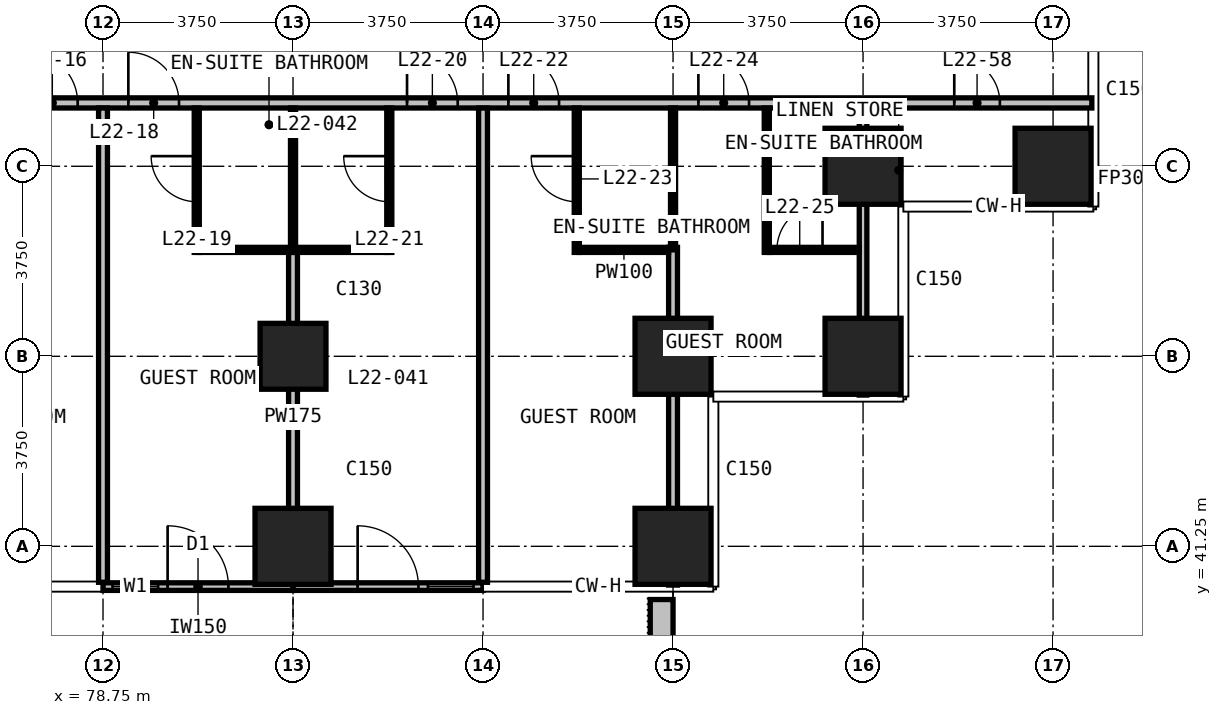
"""IFC4 building model, lengths in metres.
Left out: names, types, materials, properties, quantities, classifications, styles, units other than length and angle.
Written with IfcOpenShell. Run it as: python <this file> out.ifc"""

import sys

from ifc_helpers import new_model, si_unit, direction, frame, frame_2d, origin, origin_2d, place, context, subcontext, project, spatial, rectangle, extrude, element, fill, save


model = new_model("IFC4")
c1 = context("Model", 3, precision=1e-05, world=origin(), true_north=direction((0.0, 1.0)))
c2 = subcontext(c1, "Body", "Model", "MODEL_VIEW")
j1 = project(units=[si_unit("LENGTHUNIT", "METRE"), si_unit("PLANEANGLEUNIT", "RADIAN")], contexts=[c1])
p1 = place(None, origin())
s1 = spatial("IfcSite", under=j1, at=p1, CompositionType="ELEMENT")
p2 = place(p1, origin())
s2 = spatial("IfcBuilding", under=s1, at=p2, CompositionType="ELEMENT")
p3 = place(p2, frame((0.0, 0.0, 92.3)))
s3 = spatial("IfcBuildingStorey", under=s2, at=p3, CompositionType="ELEMENT", Elevation=92.3)
p4 = place(p3, frame((82.5, 41.25, 0.0), z_axis=(0.0, 0.0, 1.0), x_axis=(1.0, 0.0, 0.0)))
e1 = element("IfcColumn", 1, at=p4, inside=s3, PredefinedType="COLUMN", context=c2, shape_type="SweptSolid", body=[
    extrude(rectangle(XDim=1.5, YDim=1.5, at=origin_2d()), origin(), (0.0, 0.0, 1.0), 3.3),
])
p5 = place(p3, frame((82.5, 45.0, 0.0), z_axis=(0.0, 0.0, 1.0), x_axis=(1.0, 0.0, 0.0)))
e2 = element("IfcColumn", 2, at=p5, inside=s3, PredefinedType="COLUMN", context=c2, shape_type="SweptSolid", body=[
    extrude(rectangle(XDim=1.3, YDim=1.3, at=origin_2d()), origin(), (0.0, 0.0, 1.0), 3.3),
])
for number, where, z_axis, x_axis in (
    (3, (90.0, 41.25, 0.0), (0.0, 0.0, 1.0), (1.0, 0.0, 0.0)),
    (4, (90.0, 45.0, 0.0), (0.0, 0.0, 1.0), (1.0, 0.0, 0.0)),
    (5, (93.75, 45.0, 0.0), (0.0, 0.0, 1.0), (1.0, 0.0, 0.0)),
    (6, (93.75, 48.75, 0.0), (0.0, 0.0, 1.0), (1.0, 0.0, 0.0)),
    (7, (97.5, 48.75, 0.0), (0.0, 0.0, 1.0), (1.0, 0.0, 0.0)),
):
    element("IfcColumn", number, at=place(p3, frame(where, z_axis=z_axis, x_axis=x_axis)), inside=s3, PredefinedType="COLUMN", context=c2, shape_type="SweptSolid", body=[
        extrude(rectangle(XDim=1.5, YDim=1.5, at=origin_2d()), origin(), (0.0, 0.0, 1.0), 3.3),
    ])
p6 = place(p3, frame((78.75, 40.455, 0.0), z_axis=(0.0, 0.0, 1.0), x_axis=(1.0, 0.0, 0.0)))
e8 = element("IfcWall", 8, at=p6, inside=s3, PredefinedType="SOLIDWALL", context=c2, shape_type="SweptSolid", body=[
    extrude(rectangle(XDim=3.75, YDim=0.15, at=frame_2d((1.875, 0.0))), origin(), (0.0, 0.0, 1.0), 3.0),
])
p7 = place(p6, frame((0.188, 0.0, 0.1)))
e9 = element("IfcOpeningElement", 9, at=p7, cuts=e8, PredefinedType="OPENING", context=c2, shape_type="SweptSolid", body=[
    extrude(rectangle(XDim=0.9, YDim=2.4, at=frame_2d((0.45, 1.2))), frame((0.0, 0.085, 0.0), z_axis=(0.0, -1.0, 0.0), x_axis=(1.0, 0.0, 0.0)), (0.0, 0.0, 1.0), 0.17),
])
p8 = place(p6, frame((1.275, 0.0, 0.0)))
e10 = element("IfcOpeningElement", 10, at=p8, cuts=e8, PredefinedType="OPENING", context=c2, shape_type="SweptSolid", body=[
    extrude(rectangle(XDim=1.2, YDim=2.4, at=frame_2d((0.6, 1.2))), frame((0.0, 0.085, 0.0), z_axis=(0.0, -1.0, 0.0), x_axis=(1.0, 0.0, 0.0)), (0.0, 0.0, 1.0), 0.17),
])
p9 = place(p3, frame((82.5, 40.455, 0.0), z_axis=(0.0, 0.0, 1.0), x_axis=(1.0, 0.0, 0.0)))
e11 = element("IfcWall", 11, at=p9, inside=s3, PredefinedType="SOLIDWALL", context=c2, shape_type="SweptSolid", body=[
    extrude(rectangle(XDim=3.75, YDim=0.15, at=frame_2d((1.875, 0.0))), origin(), (0.0, 0.0, 1.0), 3.0),
])
p10 = place(p9, frame((1.275, 0.0, 0.0)))
e12 = element("IfcOpeningElement", 12, at=p10, cuts=e11, PredefinedType="OPENING", context=c2, shape_type="SweptSolid", body=[
    extrude(rectangle(XDim=1.2, YDim=2.4, at=frame_2d((0.6, 1.2))), frame((0.0, 0.085, 0.0), z_axis=(0.0, -1.0, 0.0), x_axis=(1.0, 0.0, 0.0)), (0.0, 0.0, 1.0), 0.17),
])
p11 = place(p9, frame((2.663, 0.0, 0.1)))
e13 = element("IfcOpeningElement", 13, at=p11, cuts=e11, PredefinedType="OPENING", context=c2, shape_type="SweptSolid", body=[
    extrude(rectangle(XDim=0.9, YDim=2.4, at=frame_2d((0.45, 1.2))), frame((0.0, 0.085, 0.0), z_axis=(0.0, -1.0, 0.0), x_axis=(1.0, 0.0, 0.0)), (0.0, 0.0, 1.0), 0.17),
])
p12 = place(p3, frame((89.775, 40.2, 0.0), z_axis=(0.0, 0.0, 1.0), x_axis=(0.0, -1.0, 0.0)))
e14 = element("IfcWall", 14, at=p12, inside=s3, PredefinedType="USERDEFINED", context=c2, shape_type="SweptSolid", body=[
    extrude(rectangle(XDim=2.35, YDim=0.45, at=frame_2d((1.175, 0.0))), origin(), (0.0, 0.0, 1.0), 1.1),
])
p13 = place(p3, frame((51.735, 50.0, 0.0), z_axis=(0.0, 0.0, 1.0), x_axis=(1.0, 0.0, 0.0)))
e15 = element("IfcWall", 15, at=p13, inside=s3, PredefinedType="PARTITIONING", context=c2, shape_type="SweptSolid", body=[
    extrude(rectangle(XDim=46.53, YDim=0.2, at=frame_2d((23.265, 0.0))), origin(), (0.0, 0.0, 1.0), 3.0),
])
p14 = place(p13, frame((6.765, 0.0, 0.0)))
e16 = element("IfcOpeningElement", 16, at=p14, cuts=e15, PredefinedType="OPENING", context=c2, shape_type="SweptSolid", body=[
    extrude(rectangle(XDim=1.0, YDim=2.2, at=frame_2d((0.5, 1.1))), frame((0.0, 0.11, 0.0), z_axis=(0.0, -1.0, 0.0), x_axis=(1.0, 0.0, 0.0)), (0.0, 0.0, 1.0), 0.22),
])
p15 = place(p13, frame((10.515, 0.0, 0.0)))
e17 = element("IfcOpeningElement", 17, at=p15, cuts=e15, PredefinedType="OPENING", context=c2, shape_type="SweptSolid", body=[
    extrude(rectangle(XDim=1.0, YDim=2.2, at=frame_2d((0.5, 1.1))), frame((0.0, 0.11, 0.0), z_axis=(0.0, -1.0, 0.0), x_axis=(1.0, 0.0, 0.0)), (0.0, 0.0, 1.0), 0.22),
])
p16 = place(p13, frame((12.515, 0.0, 0.0)))
e18 = element("IfcOpeningElement", 18, at=p16, cuts=e15, PredefinedType="OPENING", context=c2, shape_type="SweptSolid", body=[
    extrude(rectangle(XDim=1.0, YDim=2.2, at=frame_2d((0.5, 1.1))), frame((0.0, 0.11, 0.0), z_axis=(0.0, -1.0, 0.0), x_axis=(1.0, 0.0, 0.0)), (0.0, 0.0, 1.0), 0.22),
])
p17 = place(p13, frame((18.015, 0.0, 0.0)))
e19 = element("IfcOpeningElement", 19, at=p17, cuts=e15, PredefinedType="OPENING", context=c2, shape_type="SweptSolid", body=[
    extrude(rectangle(XDim=1.0, YDim=2.2, at=frame_2d((0.5, 1.1))), frame((0.0, 0.11, 0.0), z_axis=(0.0, -1.0, 0.0), x_axis=(1.0, 0.0, 0.0)), (0.0, 0.0, 1.0), 0.22),
])
p18 = place(p13, frame((20.015, 0.0, 0.0)))
e20 = element("IfcOpeningElement", 20, at=p18, cuts=e15, PredefinedType="OPENING", context=c2, shape_type="SweptSolid", body=[
    extrude(rectangle(XDim=1.0, YDim=2.2, at=frame_2d((0.5, 1.1))), frame((0.0, 0.11, 0.0), z_axis=(0.0, -1.0, 0.0), x_axis=(1.0, 0.0, 0.0)), (0.0, 0.0, 1.0), 0.22),
])
p19 = place(p13, frame((25.515, 0.0, 0.0)))
e21 = element("IfcOpeningElement", 21, at=p19, cuts=e15, PredefinedType="OPENING", context=c2, shape_type="SweptSolid", body=[
    extrude(rectangle(XDim=1.0, YDim=2.2, at=frame_2d((0.5, 1.1))), frame((0.0, 0.11, 0.0), z_axis=(0.0, -1.0, 0.0), x_axis=(1.0, 0.0, 0.0)), (0.0, 0.0, 1.0), 0.22),
])
p20 = place(p13, frame((27.515, 0.0, 0.0)))
e22 = element("IfcOpeningElement", 22, at=p20, cuts=e15, PredefinedType="OPENING", context=c2, shape_type="SweptSolid", body=[
    extrude(rectangle(XDim=1.0, YDim=2.2, at=frame_2d((0.5, 1.1))), frame((0.0, 0.11, 0.0), z_axis=(0.0, -1.0, 0.0), x_axis=(1.0, 0.0, 0.0)), (0.0, 0.0, 1.0), 0.22),
])
p21 = place(p13, frame((33.015, 0.0, 0.0)))
e23 = element("IfcOpeningElement", 23, at=p21, cuts=e15, PredefinedType="OPENING", context=c2, shape_type="SweptSolid", body=[
    extrude(rectangle(XDim=1.0, YDim=2.2, at=frame_2d((0.5, 1.1))), frame((0.0, 0.11, 0.0), z_axis=(0.0, -1.0, 0.0), x_axis=(1.0, 0.0, 0.0)), (0.0, 0.0, 1.0), 0.22),
])
p22 = place(p13, frame((35.015, 0.0, 0.0)))
e24 = element("IfcOpeningElement", 24, at=p22, cuts=e15, PredefinedType="OPENING", context=c2, shape_type="SweptSolid", body=[
    extrude(rectangle(XDim=1.0, YDim=2.2, at=frame_2d((0.5, 1.1))), frame((0.0, 0.11, 0.0), z_axis=(0.0, -1.0, 0.0), x_axis=(1.0, 0.0, 0.0)), (0.0, 0.0, 1.0), 0.22),
])
p23 = place(p13, frame((38.765, 0.0, 0.0)))
e25 = element("IfcOpeningElement", 25, at=p23, cuts=e15, PredefinedType="OPENING", context=c2, shape_type="SweptSolid", body=[
    extrude(rectangle(XDim=1.0, YDim=2.2, at=frame_2d((0.5, 1.1))), frame((0.0, 0.11, 0.0), z_axis=(0.0, -1.0, 0.0), x_axis=(1.0, 0.0, 0.0)), (0.0, 0.0, 1.0), 0.22),
])
p24 = place(p13, frame((1.8, 0.0, 0.0)))
e26 = element("IfcOpeningElement", 26, at=p24, cuts=e15, PredefinedType="OPENING", context=c2, shape_type="SweptSolid", body=[
    extrude(rectangle(XDim=0.9, YDim=2.2, at=frame_2d((0.45, 1.1))), frame((0.0, 0.11, 0.0), z_axis=(0.0, -1.0, 0.0), x_axis=(1.0, 0.0, 0.0)), (0.0, 0.0, 1.0), 0.22),
])
p25 = place(p13, frame((43.815, 0.0, 0.0)))
e27 = element("IfcOpeningElement", 27, at=p25, cuts=e15, PredefinedType="OPENING", context=c2, shape_type="SweptSolid", body=[
    extrude(rectangle(XDim=0.9, YDim=2.2, at=frame_2d((0.45, 1.1))), frame((0.0, 0.11, 0.0), z_axis=(0.0, -1.0, 0.0), x_axis=(1.0, 0.0, 0.0)), (0.0, 0.0, 1.0), 0.22),
])
p26 = place(p3, frame((78.75, 40.54, 0.0), z_axis=(0.0, 0.0, 1.0), x_axis=(0.0, 1.0, 0.0)))
e28 = element("IfcWall", 28, at=p26, inside=s3, PredefinedType="PARTITIONING", context=c2, shape_type="SweptSolid", body=[
    extrude(rectangle(XDim=9.36, YDim=0.175, at=frame_2d((4.68, 0.0))), origin(), (0.0, 0.0, 1.0), 3.0),
])
p27 = place(p3, frame((82.5, 40.54, 0.0), z_axis=(0.0, 0.0, 1.0), x_axis=(0.0, 1.0, 0.0)))
e29 = element("IfcWall", 29, at=p27, inside=s3, PredefinedType="PARTITIONING", context=c2, shape_type="SweptSolid", body=[
    extrude(rectangle(XDim=6.51, YDim=0.175, at=frame_2d((3.255, 0.0))), origin(), (0.0, 0.0, 1.0), 3.0),
])
p28 = place(p3, frame((86.25, 40.54, 0.0), z_axis=(0.0, 0.0, 1.0), x_axis=(0.0, 1.0, 0.0)))
e30 = element("IfcWall", 30, at=p28, inside=s3, PredefinedType="PARTITIONING", context=c2, shape_type="SweptSolid", body=[
    extrude(rectangle(XDim=9.36, YDim=0.175, at=frame_2d((4.68, 0.0))), origin(), (0.0, 0.0, 1.0), 3.0),
])
p29 = place(p3, frame((90.0, 40.485, 0.0), z_axis=(0.0, 0.0, 1.0), x_axis=(0.0, 1.0, 0.0)))
e31 = element("IfcWall", 31, at=p29, inside=s3, PredefinedType="PARTITIONING", context=c2, shape_type="SweptSolid", body=[
    extrude(rectangle(XDim=6.665, YDim=0.175, at=frame_2d((3.333, 0.0))), origin(), (0.0, 0.0, 1.0), 3.0),
])
p30 = place(p3, frame((93.75, 44.235, 0.0), z_axis=(0.0, 0.0, 1.0), x_axis=(0.0, 1.0, 0.0)))
e32 = element("IfcWall", 32, at=p30, inside=s3, PredefinedType="PARTITIONING", context=c2, shape_type="SweptSolid", body=[
    extrude(rectangle(XDim=5.665, YDim=0.15, at=frame_2d((2.833, 0.0))), origin(), (0.0, 0.0, 1.0), 3.0),
])
p31 = place(p3, frame((80.65, 47.1, 0.0), z_axis=(0.0, 0.0, 1.0), x_axis=(1.0, 0.0, 0.0)))
e33 = element("IfcWall", 33, at=p31, inside=s3, PredefinedType="PARTITIONING", context=c2, shape_type="SweptSolid", body=[
    extrude(rectangle(XDim=3.7, YDim=0.1, at=frame_2d((1.85, 0.0))), origin(), (0.0, 0.0, 1.0), 3.0),
])
p32 = place(p3, frame((88.15, 47.1, 0.0), z_axis=(0.0, 0.0, 1.0), x_axis=(1.0, 0.0, 0.0)))
e34 = element("IfcWall", 34, at=p32, inside=s3, PredefinedType="PARTITIONING", context=c2, shape_type="SweptSolid", body=[
    extrude(rectangle(XDim=1.762, YDim=0.1, at=frame_2d((0.881, 0.0))), origin(), (0.0, 0.0, 1.0), 3.0),
])
p33 = place(p3, frame((91.9, 47.1, 0.0), z_axis=(0.0, 0.0, 1.0), x_axis=(1.0, 0.0, 0.0)))
e35 = element("IfcWall", 35, at=p33, inside=s3, PredefinedType="PARTITIONING", context=c2, shape_type="SweptSolid", body=[
    extrude(rectangle(XDim=1.775, YDim=0.1, at=frame_2d((0.888, 0.0))), origin(), (0.0, 0.0, 1.0), 3.0),
])
p34 = place(p33, frame((0.15, 0.0, 0.0)))
e36 = element("IfcOpeningElement", 36, at=p34, cuts=e35, PredefinedType="OPENING", context=c2, shape_type="SweptSolid", body=[
    extrude(rectangle(XDim=0.9, YDim=2.2, at=frame_2d((0.45, 1.1))), frame((0.0, 0.06, 0.0), z_axis=(0.0, -1.0, 0.0), x_axis=(1.0, 0.0, 0.0)), (0.0, 0.0, 1.0), 0.12),
])
p35 = place(p3, frame((80.6, 47.05, 0.0), z_axis=(0.0, 0.0, 1.0), x_axis=(0.0, 1.0, 0.0)))
e37 = element("IfcWall", 37, at=p35, inside=s3, PredefinedType="PARTITIONING", context=c2, shape_type="SweptSolid", body=[
    extrude(rectangle(XDim=2.85, YDim=0.1, at=frame_2d((1.425, 0.0))), origin(), (0.0, 0.0, 1.0), 3.0),
])
p36 = place(p35, frame((1.0, 0.0, 0.0)))
e38 = element("IfcOpeningElement", 38, at=p36, cuts=e37, PredefinedType="OPENING", context=c2, shape_type="SweptSolid", body=[
    extrude(rectangle(XDim=0.9, YDim=2.2, at=frame_2d((0.45, 1.1))), frame((0.0, 0.06, 0.0), z_axis=(0.0, -1.0, 0.0), x_axis=(1.0, 0.0, 0.0)), (0.0, 0.0, 1.0), 0.12),
])
p37 = place(p3, frame((82.5, 47.15, 0.0), z_axis=(0.0, 0.0, 1.0), x_axis=(0.0, 1.0, 0.0)))
e39 = element("IfcWall", 39, at=p37, inside=s3, PredefinedType="PARTITIONING", context=c2, shape_type="SweptSolid", body=[
    extrude(rectangle(XDim=2.75, YDim=0.1, at=frame_2d((1.375, 0.0))), origin(), (0.0, 0.0, 1.0), 3.0),
])
p38 = place(p3, frame((84.4, 47.05, 0.0), z_axis=(0.0, 0.0, 1.0), x_axis=(0.0, 1.0, 0.0)))
e40 = element("IfcWall", 40, at=p38, inside=s3, PredefinedType="PARTITIONING", context=c2, shape_type="SweptSolid", body=[
    extrude(rectangle(XDim=2.85, YDim=0.1, at=frame_2d((1.425, 0.0))), origin(), (0.0, 0.0, 1.0), 3.0),
])
p39 = place(p38, frame((1.0, 0.0, 0.0)))
e41 = element("IfcOpeningElement", 41, at=p39, cuts=e40, PredefinedType="OPENING", context=c2, shape_type="SweptSolid", body=[
    extrude(rectangle(XDim=0.9, YDim=2.2, at=frame_2d((0.45, 1.1))), frame((0.0, 0.06, 0.0), z_axis=(0.0, -1.0, 0.0), x_axis=(1.0, 0.0, 0.0)), (0.0, 0.0, 1.0), 0.12),
])
p40 = place(p3, frame((88.1, 47.05, 0.0), z_axis=(0.0, 0.0, 1.0), x_axis=(0.0, 1.0, 0.0)))
e42 = element("IfcWall", 42, at=p40, inside=s3, PredefinedType="PARTITIONING", context=c2, shape_type="SweptSolid", body=[
    extrude(rectangle(XDim=2.85, YDim=0.1, at=frame_2d((1.425, 0.0))), origin(), (0.0, 0.0, 1.0), 3.0),
])
p41 = place(p40, frame((1.0, 0.0, 0.0)))
e43 = element("IfcOpeningElement", 43, at=p41, cuts=e42, PredefinedType="OPENING", context=c2, shape_type="SweptSolid", body=[
    extrude(rectangle(XDim=0.9, YDim=2.2, at=frame_2d((0.45, 1.1))), frame((0.0, 0.06, 0.0), z_axis=(0.0, -1.0, 0.0), x_axis=(1.0, 0.0, 0.0)), (0.0, 0.0, 1.0), 0.12),
])
p42 = place(p3, frame((90.0, 47.1, 0.0), z_axis=(0.0, 0.0, 1.0), x_axis=(0.0, 1.0, 0.0)))
e44 = element("IfcWall", 44, at=p42, inside=s3, PredefinedType="PARTITIONING", context=c2, shape_type="SweptSolid", body=[
    extrude(rectangle(XDim=2.8, YDim=0.1, at=frame_2d((1.4, 0.0))), origin(), (0.0, 0.0, 1.0), 3.0),
])
p43 = place(p3, frame((91.85, 47.05, 0.0), z_axis=(0.0, 0.0, 1.0), x_axis=(0.0, 1.0, 0.0)))
e45 = element("IfcWall", 45, at=p43, inside=s3, PredefinedType="PARTITIONING", context=c2, shape_type="SweptSolid", body=[
    extrude(rectangle(XDim=2.85, YDim=0.1, at=frame_2d((1.425, 0.0))), origin(), (0.0, 0.0, 1.0), 3.0),
])
p44 = place(p7, origin())
e46 = element("IfcWindow", 46, at=p44, inside=s3, PartitioningType="SINGLE_PANEL", PredefinedType="WINDOW", context=c2, shape_type="SweptSolid", body=[
    extrude(rectangle(XDim=0.9, YDim=2.4, at=frame_2d((0.45, 1.2))), frame((0.0, 0.03, 0.0), z_axis=(0.0, -1.0, 0.0), x_axis=(1.0, 0.0, 0.0)), (0.0, 0.0, 1.0), 0.06),
])
fill(e9, e46)
p45 = place(p8, origin())
e47 = element("IfcDoor", 47, at=p45, inside=s3, OperationType="SINGLE_SWING_LEFT", PredefinedType="DOOR", context=c2, shape_type="SweptSolid", body=[
    extrude(rectangle(XDim=1.2, YDim=2.4, at=frame_2d((0.6, 1.2))), frame((0.0, 0.025, 0.0), z_axis=(0.0, -1.0, 0.0), x_axis=(1.0, 0.0, 0.0)), (0.0, 0.0, 1.0), 0.05),
])
fill(e10, e47)
p46 = place(p10, origin())
e48 = element("IfcDoor", 48, at=p46, inside=s3, OperationType="SINGLE_SWING_LEFT", PredefinedType="DOOR", context=c2, shape_type="SweptSolid", body=[
    extrude(rectangle(XDim=1.2, YDim=2.4, at=frame_2d((0.6, 1.2))), frame((0.0, 0.025, 0.0), z_axis=(0.0, -1.0, 0.0), x_axis=(1.0, 0.0, 0.0)), (0.0, 0.0, 1.0), 0.05),
])
fill(e12, e48)
p47 = place(p11, origin())
e49 = element("IfcWindow", 49, at=p47, inside=s3, PartitioningType="SINGLE_PANEL", PredefinedType="WINDOW", context=c2, shape_type="SweptSolid", body=[
    extrude(rectangle(XDim=0.9, YDim=2.4, at=frame_2d((0.45, 1.2))), frame((0.0, 0.03, 0.0), z_axis=(0.0, -1.0, 0.0), x_axis=(1.0, 0.0, 0.0)), (0.0, 0.0, 1.0), 0.06),
])
fill(e13, e49)
p48 = place(p19, origin())
e50 = element("IfcDoor", 50, at=p48, inside=s3, OperationType="SINGLE_SWING_LEFT", PredefinedType="DOOR", context=c2, shape_type="SweptSolid", body=[
    extrude(rectangle(XDim=1.0, YDim=2.2, at=frame_2d((0.5, 1.1))), frame((0.0, 0.025, 0.0), z_axis=(0.0, -1.0, 0.0), x_axis=(1.0, 0.0, 0.0)), (0.0, 0.0, 1.0), 0.05),
])
fill(e21, e50)
p49 = place(p20, origin())
e51 = element("IfcDoor", 51, at=p49, inside=s3, OperationType="SINGLE_SWING_LEFT", PredefinedType="DOOR", context=c2, shape_type="SweptSolid", body=[
    extrude(rectangle(XDim=1.0, YDim=2.2, at=frame_2d((0.5, 1.1))), frame((0.0, 0.025, 0.0), z_axis=(0.0, -1.0, 0.0), x_axis=(1.0, 0.0, 0.0)), (0.0, 0.0, 1.0), 0.05),
])
fill(e22, e51)
p50 = place(p36, origin())
e52 = element("IfcDoor", 52, at=p50, inside=s3, OperationType="SINGLE_SWING_RIGHT", PredefinedType="DOOR", context=c2, shape_type="SweptSolid", body=[
    extrude(rectangle(XDim=0.9, YDim=2.2, at=frame_2d((0.45, 1.1))), frame((0.0, 0.025, 0.0), z_axis=(0.0, -1.0, 0.0), x_axis=(1.0, 0.0, 0.0)), (0.0, 0.0, 1.0), 0.05),
])
fill(e38, e52)
p51 = place(p21, origin())
e53 = element("IfcDoor", 53, at=p51, inside=s3, OperationType="SINGLE_SWING_LEFT", PredefinedType="DOOR", context=c2, shape_type="SweptSolid", body=[
    extrude(rectangle(XDim=1.0, YDim=2.2, at=frame_2d((0.5, 1.1))), frame((0.0, 0.025, 0.0), z_axis=(0.0, -1.0, 0.0), x_axis=(1.0, 0.0, 0.0)), (0.0, 0.0, 1.0), 0.05),
])
fill(e23, e53)
p52 = place(p39, origin())
e54 = element("IfcDoor", 54, at=p52, inside=s3, OperationType="SINGLE_SWING_RIGHT", PredefinedType="DOOR", context=c2, shape_type="SweptSolid", body=[
    extrude(rectangle(XDim=0.9, YDim=2.2, at=frame_2d((0.45, 1.1))), frame((0.0, 0.025, 0.0), z_axis=(0.0, -1.0, 0.0), x_axis=(1.0, 0.0, 0.0)), (0.0, 0.0, 1.0), 0.05),
])
fill(e41, e54)
p53 = place(p22, origin())
e55 = element("IfcDoor", 55, at=p53, inside=s3, OperationType="SINGLE_SWING_LEFT", PredefinedType="DOOR", context=c2, shape_type="SweptSolid", body=[
    extrude(rectangle(XDim=1.0, YDim=2.2, at=frame_2d((0.5, 1.1))), frame((0.0, 0.025, 0.0), z_axis=(0.0, -1.0, 0.0), x_axis=(1.0, 0.0, 0.0)), (0.0, 0.0, 1.0), 0.05),
])
fill(e24, e55)
p54 = place(p41, origin())
e56 = element("IfcDoor", 56, at=p54, inside=s3, OperationType="SINGLE_SWING_RIGHT", PredefinedType="DOOR", context=c2, shape_type="SweptSolid", body=[
    extrude(rectangle(XDim=0.9, YDim=2.2, at=frame_2d((0.45, 1.1))), frame((0.0, 0.025, 0.0), z_axis=(0.0, -1.0, 0.0), x_axis=(1.0, 0.0, 0.0)), (0.0, 0.0, 1.0), 0.05),
])
fill(e43, e56)
p55 = place(p23, origin())
e57 = element("IfcDoor", 57, at=p55, inside=s3, OperationType="SINGLE_SWING_LEFT", PredefinedType="DOOR", context=c2, shape_type="SweptSolid", body=[
    extrude(rectangle(XDim=1.0, YDim=2.2, at=frame_2d((0.5, 1.1))), frame((0.0, 0.025, 0.0), z_axis=(0.0, -1.0, 0.0), x_axis=(1.0, 0.0, 0.0)), (0.0, 0.0, 1.0), 0.05),
])
fill(e25, e57)
p56 = place(p34, origin())
e58 = element("IfcDoor", 58, at=p56, inside=s3, OperationType="SINGLE_SWING_RIGHT", PredefinedType="DOOR", context=c2, shape_type="SweptSolid", body=[
    extrude(rectangle(XDim=0.9, YDim=2.2, at=frame_2d((0.45, 1.1))), frame((0.0, 0.025, 0.0), z_axis=(0.0, -1.0, 0.0), x_axis=(1.0, 0.0, 0.0)), (0.0, 0.0, 1.0), 0.05),
])
fill(e36, e58)
p57 = place(p25, origin())
e59 = element("IfcDoor", 59, at=p57, inside=s3, OperationType="SINGLE_SWING_LEFT", PredefinedType="DOOR", context=c2, shape_type="SweptSolid", body=[
    extrude(rectangle(XDim=0.9, YDim=2.2, at=frame_2d((0.45, 1.1))), frame((0.0, 0.025, 0.0), z_axis=(0.0, -1.0, 0.0), x_axis=(1.0, 0.0, 0.0)), (0.0, 0.0, 1.0), 0.05),
])
fill(e27, e59)
save(model, sys.argv[1])
